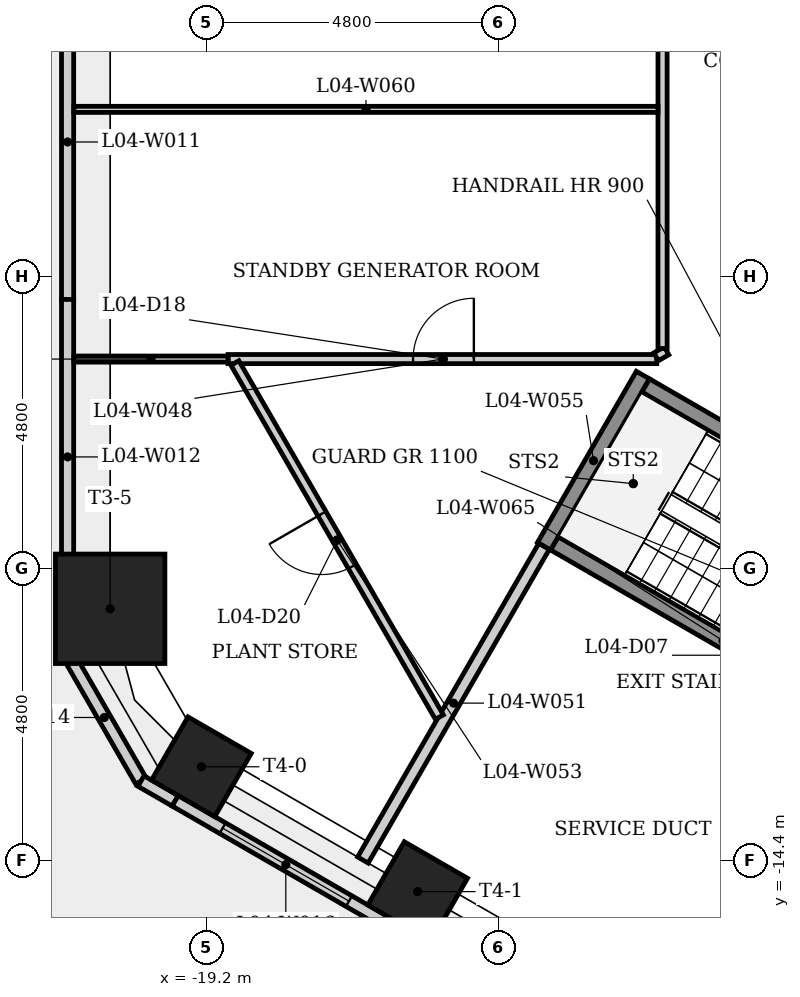
"""IFC4 building model, lengths in metres.
Left out: names, types, materials, properties, quantities, classifications, styles, units other than length and angle.
Written with IfcOpenShell. Run it as: python <this file> out.ifc"""

import sys

from ifc_helpers import new_model, si_unit, direction, frame, frame_2d, origin, origin_2d, place, context, subcontext, project, spatial, rectangle, extrude, element, fill, save


model = new_model("IFC4")
c1 = context("Model", 3, precision=1e-05, world=origin(), true_north=direction((0.0, 1.0)))
c2 = subcontext(c1, "Body", "Model", "MODEL_VIEW")
j1 = project(units=[si_unit("LENGTHUNIT", "METRE"), si_unit("PLANEANGLEUNIT", "RADIAN")], contexts=[c1])
p1 = place(None, origin())
s1 = spatial("IfcSite", under=j1, at=p1, CompositionType="ELEMENT")
p2 = place(p1, origin())
s2 = spatial("IfcBuilding", under=s1, at=p2, CompositionType="ELEMENT")
p3 = place(p2, frame((0.0, 0.0, 20.5)))
s3 = spatial("IfcBuildingStorey", under=s2, at=p3, CompositionType="ELEMENT", Elevation=20.5)
p4 = place(p3, frame((-20.785, -10.268, 0.0), z_axis=(0.0, 0.0, 1.0), x_axis=(-1.0, 0.0, 0.0)))
e1 = element("IfcColumn", 1, at=p4, inside=s3, PredefinedType="COLUMN", context=c2, shape_type="SweptSolid", body=[
    extrude(rectangle(XDim=1.8, YDim=1.8, at=origin_2d()), origin(), (0.0, 0.0, 1.0), 5.0),
])
for number, where, z_axis, x_axis in (
    (2, (-19.285, -12.866, 0.0), (0.0, 0.0, 1.0), (-0.5, -0.866, 0.0)),
    (3, (-15.728, -14.92, 0.0), (0.0, 0.0, 1.0), (-0.5, -0.866, 0.0)),
):
    element("IfcColumn", number, at=place(p3, frame(where, z_axis=z_axis, x_axis=x_axis)), inside=s3, PredefinedType="COLUMN", context=c2, shape_type="SweptSolid", body=[
        extrude(rectangle(XDim=1.2, YDim=1.2, at=origin_2d()), origin(), (0.0, 0.0, 1.0), 5.0),
    ])
p5 = place(p3, frame((-21.485, 0.0, 0.0), z_axis=(0.0, 0.0, 1.0), x_axis=(0.0, -1.0, 0.0)))
e4 = element("IfcWall", 4, at=p5, inside=s3, PredefinedType="SOLIDWALL", context=c2, shape_type="SweptSolid", body=[
    extrude(rectangle(XDim=5.18, YDim=0.2, at=frame_2d((2.59, 0.0))), origin(), (0.0, 0.0, 1.0), 4.88),
])
p6 = place(p3, frame((-21.485, -5.18, 0.0), z_axis=(0.0, 0.0, 1.0), x_axis=(0.0, -1.0, 0.0)))
e5 = element("IfcWall", 5, at=p6, inside=s3, PredefinedType="SOLIDWALL", context=c2, shape_type="SweptSolid", body=[
    extrude(rectangle(XDim=5.18, YDim=0.2, at=frame_2d((2.59, 0.0))), origin(), (0.0, 0.0, 1.0), 4.88),
])
p7 = place(p3, frame((-21.485, -10.36, 0.0), z_axis=(0.0, 0.0, 1.0), x_axis=(0.0, -1.0, 0.0)))
e6 = element("IfcWall", 6, at=p7, inside=s3, PredefinedType="SOLIDWALL", context=c2, shape_type="SweptSolid", body=[
    extrude(rectangle(XDim=0.65, YDim=0.2, at=frame_2d((0.325, 0.0))), origin(), (0.0, 0.0, 1.0), 4.88),
])
p8 = place(p3, frame((-21.485, -11.01, 0.0), z_axis=(0.0, 0.0, 1.0), x_axis=(0.499999616612, -0.866025625133, 0.0)))
e7 = element("IfcWall", 7, at=p8, inside=s3, PredefinedType="SOLIDWALL", context=c2, shape_type="SweptSolid", body=[
    extrude(rectangle(XDim=2.415, YDim=0.2, at=frame_2d((1.207, 0.0))), origin(), (0.0, 0.0, 1.0), 4.88),
])
p9 = place(p3, frame((-20.277, -13.101, 0.0), z_axis=(0.0, 0.0, 1.0), x_axis=(0.865922902183, -0.50017749597, 0.0)))
e8 = element("IfcWall", 8, at=p9, inside=s3, PredefinedType="SOLIDWALL", context=c2, shape_type="SweptSolid", body=[
    extrude(rectangle(XDim=0.65, YDim=0.2, at=frame_2d((0.325, 0.0))), origin(), (0.0, 0.0, 1.0), 4.88),
])
p10 = place(p3, frame((-19.714, -13.426, 0.0), z_axis=(0.0, 0.0, 1.0), x_axis=(0.866041321553, -0.499972428603, 0.0)))
e9 = element("IfcWall", 9, at=p10, inside=s3, PredefinedType="SOLIDWALL", context=c2, shape_type="SweptSolid", body=[
    extrude(rectangle(XDim=4.199, YDim=0.2, at=frame_2d((2.1, 0.0))), origin(), (0.0, 0.0, 1.0), 4.88),
])
p11 = place(p10, frame((0.899, 0.0, 0.8)))
e10 = element("IfcOpeningElement", 10, at=p11, cuts=e9, PredefinedType="OPENING", context=c2, shape_type="SweptSolid", body=[
    extrude(rectangle(XDim=2.4, YDim=2.4, at=frame_2d((1.2, 1.2))), frame((0.0, 0.11, 0.0), z_axis=(0.0, -1.0, 0.0), x_axis=(1.0, 0.0, 0.0)), (0.0, 0.0, 1.0), 0.22),
])
p12 = place(p3, frame((-18.845, -6.161, 0.0), z_axis=(0.0, 0.0, 1.0), x_axis=(1.0, 0.0, 0.0)))
e11 = element("IfcWall", 11, at=p12, inside=s3, PredefinedType="PARTITIONING", context=c2, shape_type="SweptSolid", body=[
    extrude(rectangle(XDim=7.049, YDim=0.15, at=frame_2d((3.525, 0.0))), origin(), (0.0, 0.0, 1.0), 4.65),
])
p13 = place(p12, frame((3.042, 0.0, 0.0)))
e12 = element("IfcOpeningElement", 12, at=p13, cuts=e11, PredefinedType="OPENING", context=c2, shape_type="SweptSolid", body=[
    extrude(rectangle(XDim=1.0, YDim=2.1, at=frame_2d((0.5, 1.05))), frame((0.0, 0.085, 0.0), z_axis=(0.0, -1.0, 0.0), x_axis=(1.0, 0.0, 0.0)), (0.0, 0.0, 1.0), 0.17),
])
p14 = place(p3, frame((-18.845, -6.161, 0.0), z_axis=(0.0, 0.0, 1.0), x_axis=(-1.0, 0.0, 0.0)))
e13 = element("IfcWall", 13, at=p14, inside=s3, PredefinedType="PARTITIONING", context=c2, shape_type="SweptSolid", body=[
    extrude(rectangle(XDim=2.535, YDim=0.1, at=frame_2d((1.268, 0.0))), origin(), (0.0, 0.0, 1.0), 4.65),
])
p15 = place(p3, frame((-16.628, -14.4, 0.0), z_axis=(0.0, 0.0, 1.0), x_axis=(0.499994325412, 0.866028679985, 0.0)))
e14 = element("IfcWall", 14, at=p15, inside=s3, PredefinedType="PLUMBINGWALL", context=c2, shape_type="SweptSolid", body=[
    extrude(rectangle(XDim=5.959, YDim=0.2, at=frame_2d((2.98, 0.0))), origin(), (0.0, 0.0, 1.0), 4.65),
])
p16 = place(p3, frame((-15.371, -12.049, 0.0), z_axis=(0.0, 0.0, 1.0), x_axis=(-0.499996914373, 0.866027185264, 0.0)))
e15 = element("IfcWall", 15, at=p16, inside=s3, PredefinedType="PARTITIONING", context=c2, shape_type="SweptSolid", body=[
    extrude(rectangle(XDim=6.725, YDim=0.15, at=frame_2d((3.362, 0.0))), origin(), (0.0, 0.0, 1.0), 4.65),
])
p17 = place(p16, frame((2.862, 0.0, 0.0)))
e16 = element("IfcOpeningElement", 16, at=p17, cuts=e15, PredefinedType="OPENING", context=c2, shape_type="SweptSolid", body=[
    extrude(rectangle(XDim=1.0, YDim=2.1, at=frame_2d((0.5, 1.05))), frame((0.0, 0.085, 0.0), z_axis=(0.0, -1.0, 0.0), x_axis=(1.0, 0.0, 0.0)), (0.0, 0.0, 1.0), 0.17),
])
p18 = place(p3, frame((-13.648, -9.239, 0.0), z_axis=(0.0, 0.0, 1.0), x_axis=(0.500017246033, 0.866015446554, 0.0)))
e17 = element("IfcWall", 17, at=p18, inside=s3, PredefinedType="SHEAR", context=c2, shape_type="SweptSolid", body=[
    extrude(rectangle(XDim=3.25, YDim=0.25, at=frame_2d((1.625, 0.0))), origin(), (0.0, 0.0, 1.0), 4.65),
])
p19 = place(p3, frame((-11.977, -6.595, 0.0), z_axis=(0.0, 0.0, 1.0), x_axis=(0.866025499775, -0.499999833739, 0.0)))
e18 = element("IfcWall", 18, at=p19, inside=s3, PredefinedType="SHEAR", context=c2, shape_type="SweptSolid", body=[
    extrude(rectangle(XDim=6.4, YDim=0.25, at=frame_2d((3.2, 0.0))), origin(), (0.0, 0.0, 1.0), 4.65),
])
p20 = place(p19, frame((5.025, 0.0, 0.0)))
e19 = element("IfcOpeningElement", 19, at=p20, cuts=e18, PredefinedType="OPENING", context=c2, shape_type="SweptSolid", body=[
    extrude(rectangle(XDim=1.0, YDim=2.1, at=frame_2d((0.5, 1.05))), frame((0.0, 0.135, 0.0), z_axis=(0.0, -1.0, 0.0), x_axis=(1.0, 0.0, 0.0)), (0.0, 0.0, 1.0), 0.27),
])
p21 = place(p3, frame((-11.806, -6.123, 0.0), z_axis=(0.0, 0.0, 1.0), x_axis=(0.866103179807, 0.499865263774, 0.0)))
e20 = element("IfcWall", 20, at=p21, inside=s3, PredefinedType="PARTITIONING", context=c2, shape_type="SweptSolid", body=[
    extrude(rectangle(XDim=0.197, YDim=0.15, at=frame_2d((0.099, 0.0))), origin(), (0.0, 0.0, 1.0), 4.65),
])
p22 = place(p3, frame((-11.7, -5.987, 0.0), z_axis=(0.0, 0.0, 1.0), x_axis=(0.0, 1.0, 0.0)))
e21 = element("IfcWall", 21, at=p22, inside=s3, PredefinedType="PARTITIONING", context=c2, shape_type="SweptSolid", body=[
    extrude(rectangle(XDim=12.125, YDim=0.15, at=frame_2d((6.062, 0.0))), origin(), (0.0, 0.0, 1.0), 4.65),
])
p23 = place(p22, frame((7.507, 0.0, 0.0)))
e22 = element("IfcOpeningElement", 22, at=p23, cuts=e21, PredefinedType="OPENING", context=c2, shape_type="SweptSolid", body=[
    extrude(rectangle(XDim=1.0, YDim=2.1, at=frame_2d((0.5, 1.05))), frame((0.0, 0.085, 0.0), z_axis=(0.0, -1.0, 0.0), x_axis=(1.0, 0.0, 0.0)), (0.0, 0.0, 1.0), 0.17),
])
p24 = place(p3, frame((-11.775, -2.054, 0.0), z_axis=(0.0, 0.0, 1.0), x_axis=(-1.0, 0.0, 0.0)))
e23 = element("IfcWall", 23, at=p24, inside=s3, PredefinedType="PARTITIONING", context=c2, shape_type="SweptSolid", body=[
    extrude(rectangle(XDim=9.606, YDim=0.1, at=frame_2d((4.803, 0.0))), origin(), (0.0, 0.0, 1.0), 4.65),
])
p25 = place(p3, frame((-7.935, -12.393, 0.0), z_axis=(0.0, 0.0, 1.0), x_axis=(-0.866025499775, 0.499999833739, 0.0)))
e24 = element("IfcWall", 24, at=p25, inside=s3, PredefinedType="SHEAR", context=c2, shape_type="SweptSolid", body=[
    extrude(rectangle(XDim=6.4, YDim=0.25, at=frame_2d((3.2, 0.0))), origin(), (0.0, 0.0, 1.0), 4.65),
])
p26 = place(p11, origin())
e25 = element("IfcWindow", 25, at=p26, inside=s3, PartitioningType="SINGLE_PANEL", PredefinedType="WINDOW", context=c2, shape_type="SweptSolid", body=[
    extrude(rectangle(XDim=2.4, YDim=2.4, at=frame_2d((1.2, 1.2))), frame((0.0, 0.03, 0.0), z_axis=(0.0, -1.0, 0.0), x_axis=(1.0, 0.0, 0.0)), (0.0, 0.0, 1.0), 0.06),
])
fill(e10, e25)
p27 = place(p13, origin())
e26 = element("IfcDoor", 26, at=p27, inside=s3, OperationType="SINGLE_SWING_RIGHT", PredefinedType="DOOR", context=c2, shape_type="SweptSolid", body=[
    extrude(rectangle(XDim=1.0, YDim=2.1, at=frame_2d((0.5, 1.05))), frame((0.0, 0.025, 0.0), z_axis=(0.0, -1.0, 0.0), x_axis=(1.0, 0.0, 0.0)), (0.0, 0.0, 1.0), 0.05),
])
fill(e12, e26)
p28 = place(p17, origin())
e27 = element("IfcDoor", 27, at=p28, inside=s3, OperationType="SINGLE_SWING_RIGHT", PredefinedType="DOOR", context=c2, shape_type="SweptSolid", body=[
    extrude(rectangle(XDim=1.0, YDim=2.1, at=frame_2d((0.5, 1.05))), frame((0.0, 0.025, 0.0), z_axis=(0.0, -1.0, 0.0), x_axis=(1.0, 0.0, 0.0)), (0.0, 0.0, 1.0), 0.05),
])
fill(e16, e27)
save(model, sys.argv[1])
